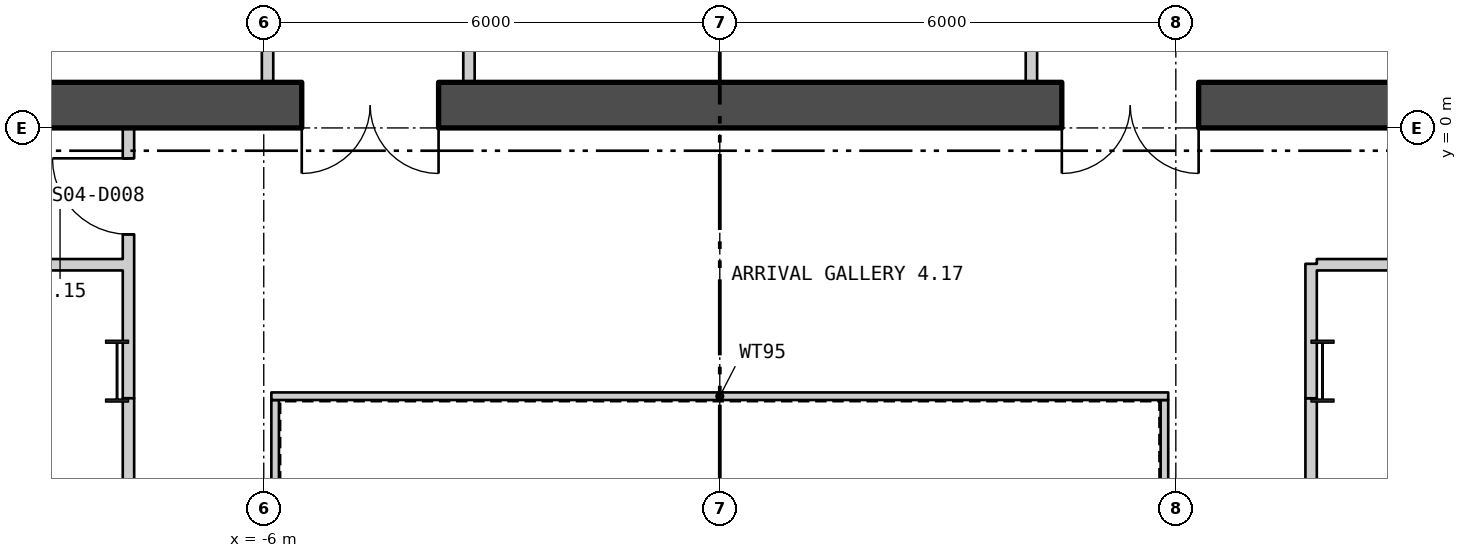
"""IFC4 building model, lengths in metres.
Left out: names, types, materials, properties, quantities, classifications, styles, units other than length and angle.
Written with IfcOpenShell. Run it as: python <this file> out.ifc"""

import sys

from ifc_helpers import new_model, si_unit, direction, frame, frame_2d, origin, origin_2d, place, context, subcontext, project, spatial, polyline, rectangle, i_section, outline, extrude, element, fill, save


model = new_model("IFC4")
c1 = context("Model", 3, precision=1e-05, world=origin(), true_north=direction((0.0, 1.0)))
c2 = subcontext(c1, "Body", "Model", "MODEL_VIEW")
j1 = project(units=[si_unit("LENGTHUNIT", "METRE"), si_unit("PLANEANGLEUNIT", "RADIAN")], contexts=[c1])
p1 = place(None, origin())
s1 = spatial("IfcSite", under=j1, at=p1, CompositionType="ELEMENT")
p2 = place(p1, origin())
s2 = spatial("IfcBuilding", under=s1, at=p2, CompositionType="ELEMENT")
p3 = place(p2, frame((0.0, 0.0, 60.3)))
s3 = spatial("IfcBuildingStorey", under=s2, at=p3, CompositionType="ELEMENT", Elevation=60.3)
for number, where, z_axis, x_axis in (
    (1, (7.93, -3.2, 0.0), (0.0, 0.0, 1.0), (1.0, 0.0, 0.0)),
    (2, (-7.93, -3.2, 0.0), (0.0, 0.0, 1.0), (1.0, 0.0, 0.0)),
):
    element("IfcColumn", number, at=place(p3, frame(where, z_axis=z_axis, x_axis=x_axis)), inside=s3, PredefinedType="COLUMN", context=c2, shape_type="SweptSolid", body=[
        extrude(i_section(OverallWidth=0.303, OverallDepth=0.814, WebThickness=0.021, FlangeThickness=0.04, at=origin_2d()), origin(), (0.0, 0.0, 1.0), 4.5),
    ])
p4 = place(p3, frame((-28.3, 10.579, -0.18), z_axis=(0.0, 0.0, 1.0), x_axis=(0.499999388847, -0.866025756634, 0.0)))
e3 = element("IfcWall", 3, at=p4, inside=s3, PredefinedType="SOLIDWALL", context=c2, shape_type="SweptSolid", body=[
    extrude(outline(polyline([(-0.13, -0.225), (45.88, -0.225), (45.62, 0.225), (0.13, 0.225), (-0.13, -0.225)])), origin(), (0.0, 0.0, 1.0), 4.28),
])
p5 = place(p4, frame((1.425, 0.0, 1.08)))
e4 = element("IfcOpeningElement", 4, at=p5, cuts=e3, PredefinedType="OPENING", context=c2, shape_type="SweptSolid", body=[
    extrude(rectangle(XDim=2.4, YDim=2.6, at=frame_2d((1.2, 1.3))), frame((0.0, 0.235, 0.0), z_axis=(0.0, -1.0, 0.0), x_axis=(1.0, 0.0, 0.0)), (0.0, 0.0, 1.0), 0.47),
])
p6 = place(p4, frame((5.895, 0.0, 1.08)))
e5 = element("IfcOpeningElement", 5, at=p6, cuts=e3, PredefinedType="OPENING", context=c2, shape_type="SweptSolid", body=[
    extrude(rectangle(XDim=2.4, YDim=2.6, at=frame_2d((1.2, 1.3))), frame((0.0, 0.235, 0.0), z_axis=(0.0, -1.0, 0.0), x_axis=(1.0, 0.0, 0.0)), (0.0, 0.0, 1.0), 0.47),
])
p7 = place(p4, frame((10.403, 0.0, 1.08)))
e6 = element("IfcOpeningElement", 6, at=p7, cuts=e3, PredefinedType="OPENING", context=c2, shape_type="SweptSolid", body=[
    extrude(rectangle(XDim=2.4, YDim=2.6, at=frame_2d((1.2, 1.3))), frame((0.0, 0.235, 0.0), z_axis=(0.0, -1.0, 0.0), x_axis=(1.0, 0.0, 0.0)), (0.0, 0.0, 1.0), 0.47),
])
p8 = place(p4, frame((14.912, 0.0, 1.08)))
e7 = element("IfcOpeningElement", 7, at=p8, cuts=e3, PredefinedType="OPENING", context=c2, shape_type="SweptSolid", body=[
    extrude(rectangle(XDim=2.4, YDim=2.6, at=frame_2d((1.2, 1.3))), frame((0.0, 0.235, 0.0), z_axis=(0.0, -1.0, 0.0), x_axis=(1.0, 0.0, 0.0)), (0.0, 0.0, 1.0), 0.47),
])
p9 = place(p4, frame((19.421, 0.0, 1.08)))
e8 = element("IfcOpeningElement", 8, at=p9, cuts=e3, PredefinedType="OPENING", context=c2, shape_type="SweptSolid", body=[
    extrude(rectangle(XDim=2.4, YDim=2.6, at=frame_2d((1.2, 1.3))), frame((0.0, 0.235, 0.0), z_axis=(0.0, -1.0, 0.0), x_axis=(1.0, 0.0, 0.0)), (0.0, 0.0, 1.0), 0.47),
])
p10 = place(p4, frame((23.929, 0.0, 1.08)))
e9 = element("IfcOpeningElement", 9, at=p10, cuts=e3, PredefinedType="OPENING", context=c2, shape_type="SweptSolid", body=[
    extrude(rectangle(XDim=2.4, YDim=2.6, at=frame_2d((1.2, 1.3))), frame((0.0, 0.235, 0.0), z_axis=(0.0, -1.0, 0.0), x_axis=(1.0, 0.0, 0.0)), (0.0, 0.0, 1.0), 0.47),
])
p11 = place(p4, frame((28.438, 0.0, 1.08)))
e10 = element("IfcOpeningElement", 10, at=p11, cuts=e3, PredefinedType="OPENING", context=c2, shape_type="SweptSolid", body=[
    extrude(rectangle(XDim=2.4, YDim=2.6, at=frame_2d((1.2, 1.3))), frame((0.0, 0.235, 0.0), z_axis=(0.0, -1.0, 0.0), x_axis=(1.0, 0.0, 0.0)), (0.0, 0.0, 1.0), 0.47),
])
p12 = place(p4, frame((32.947, 0.0, 1.08)))
e11 = element("IfcOpeningElement", 11, at=p12, cuts=e3, PredefinedType="OPENING", context=c2, shape_type="SweptSolid", body=[
    extrude(rectangle(XDim=2.4, YDim=2.6, at=frame_2d((1.2, 1.3))), frame((0.0, 0.235, 0.0), z_axis=(0.0, -1.0, 0.0), x_axis=(1.0, 0.0, 0.0)), (0.0, 0.0, 1.0), 0.47),
])
p13 = place(p4, frame((37.455, 0.0, 1.08)))
e12 = element("IfcOpeningElement", 12, at=p13, cuts=e3, PredefinedType="OPENING", context=c2, shape_type="SweptSolid", body=[
    extrude(rectangle(XDim=2.4, YDim=2.6, at=frame_2d((1.2, 1.3))), frame((0.0, 0.235, 0.0), z_axis=(0.0, -1.0, 0.0), x_axis=(1.0, 0.0, 0.0)), (0.0, 0.0, 1.0), 0.47),
])
p14 = place(p4, frame((41.925, 0.0, 1.08)))
e13 = element("IfcOpeningElement", 13, at=p14, cuts=e3, PredefinedType="OPENING", context=c2, shape_type="SweptSolid", body=[
    extrude(rectangle(XDim=2.4, YDim=2.6, at=frame_2d((1.2, 1.3))), frame((0.0, 0.235, 0.0), z_axis=(0.0, -1.0, 0.0), x_axis=(1.0, 0.0, 0.0)), (0.0, 0.0, 1.0), 0.47),
])
p15 = place(p3, frame((5.425, -29.042, -0.18), z_axis=(0.0, 0.0, 1.0), x_axis=(0.499999388847, 0.866025756634, 0.0)))
e14 = element("IfcWall", 14, at=p15, inside=s3, PredefinedType="SOLIDWALL", context=c2, shape_type="SweptSolid", body=[
    extrude(outline(polyline([(-0.13, -0.225), (45.88, -0.225), (45.62, 0.225), (0.13, 0.225), (-0.13, -0.225)])), origin(), (0.0, 0.0, 1.0), 4.28),
])
p16 = place(p15, frame((1.425, 0.0, 1.08)))
e15 = element("IfcOpeningElement", 15, at=p16, cuts=e14, PredefinedType="OPENING", context=c2, shape_type="SweptSolid", body=[
    extrude(rectangle(XDim=2.4, YDim=2.6, at=frame_2d((1.2, 1.3))), frame((0.0, 0.235, 0.0), z_axis=(0.0, -1.0, 0.0), x_axis=(1.0, 0.0, 0.0)), (0.0, 0.0, 1.0), 0.47),
])
p17 = place(p15, frame((5.895, 0.0, 1.08)))
e16 = element("IfcOpeningElement", 16, at=p17, cuts=e14, PredefinedType="OPENING", context=c2, shape_type="SweptSolid", body=[
    extrude(rectangle(XDim=2.4, YDim=2.6, at=frame_2d((1.2, 1.3))), frame((0.0, 0.235, 0.0), z_axis=(0.0, -1.0, 0.0), x_axis=(1.0, 0.0, 0.0)), (0.0, 0.0, 1.0), 0.47),
])
p18 = place(p15, frame((10.403, 0.0, 1.08)))
e17 = element("IfcOpeningElement", 17, at=p18, cuts=e14, PredefinedType="OPENING", context=c2, shape_type="SweptSolid", body=[
    extrude(rectangle(XDim=2.4, YDim=2.6, at=frame_2d((1.2, 1.3))), frame((0.0, 0.235, 0.0), z_axis=(0.0, -1.0, 0.0), x_axis=(1.0, 0.0, 0.0)), (0.0, 0.0, 1.0), 0.47),
])
p19 = place(p15, frame((14.912, 0.0, 1.08)))
e18 = element("IfcOpeningElement", 18, at=p19, cuts=e14, PredefinedType="OPENING", context=c2, shape_type="SweptSolid", body=[
    extrude(rectangle(XDim=2.4, YDim=2.6, at=frame_2d((1.2, 1.3))), frame((0.0, 0.235, 0.0), z_axis=(0.0, -1.0, 0.0), x_axis=(1.0, 0.0, 0.0)), (0.0, 0.0, 1.0), 0.47),
])
p20 = place(p15, frame((19.421, 0.0, 1.08)))
e19 = element("IfcOpeningElement", 19, at=p20, cuts=e14, PredefinedType="OPENING", context=c2, shape_type="SweptSolid", body=[
    extrude(rectangle(XDim=2.4, YDim=2.6, at=frame_2d((1.2, 1.3))), frame((0.0, 0.235, 0.0), z_axis=(0.0, -1.0, 0.0), x_axis=(1.0, 0.0, 0.0)), (0.0, 0.0, 1.0), 0.47),
])
p21 = place(p15, frame((23.929, 0.0, 1.08)))
e20 = element("IfcOpeningElement", 20, at=p21, cuts=e14, PredefinedType="OPENING", context=c2, shape_type="SweptSolid", body=[
    extrude(rectangle(XDim=2.4, YDim=2.6, at=frame_2d((1.2, 1.3))), frame((0.0, 0.235, 0.0), z_axis=(0.0, -1.0, 0.0), x_axis=(1.0, 0.0, 0.0)), (0.0, 0.0, 1.0), 0.47),
])
p22 = place(p15, frame((28.438, 0.0, 1.08)))
e21 = element("IfcOpeningElement", 21, at=p22, cuts=e14, PredefinedType="OPENING", context=c2, shape_type="SweptSolid", body=[
    extrude(rectangle(XDim=2.4, YDim=2.6, at=frame_2d((1.2, 1.3))), frame((0.0, 0.235, 0.0), z_axis=(0.0, -1.0, 0.0), x_axis=(1.0, 0.0, 0.0)), (0.0, 0.0, 1.0), 0.47),
])
p23 = place(p15, frame((32.947, 0.0, 1.08)))
e22 = element("IfcOpeningElement", 22, at=p23, cuts=e14, PredefinedType="OPENING", context=c2, shape_type="SweptSolid", body=[
    extrude(rectangle(XDim=2.4, YDim=2.6, at=frame_2d((1.2, 1.3))), frame((0.0, 0.235, 0.0), z_axis=(0.0, -1.0, 0.0), x_axis=(1.0, 0.0, 0.0)), (0.0, 0.0, 1.0), 0.47),
])
p24 = place(p15, frame((37.455, 0.0, 1.08)))
e23 = element("IfcOpeningElement", 23, at=p24, cuts=e14, PredefinedType="OPENING", context=c2, shape_type="SweptSolid", body=[
    extrude(rectangle(XDim=2.4, YDim=2.6, at=frame_2d((1.2, 1.3))), frame((0.0, 0.235, 0.0), z_axis=(0.0, -1.0, 0.0), x_axis=(1.0, 0.0, 0.0)), (0.0, 0.0, 1.0), 0.47),
])
p25 = place(p15, frame((41.925, 0.0, 1.08)))
e24 = element("IfcOpeningElement", 24, at=p25, cuts=e14, PredefinedType="OPENING", context=c2, shape_type="SweptSolid", body=[
    extrude(rectangle(XDim=2.4, YDim=2.6, at=frame_2d((1.2, 1.3))), frame((0.0, 0.235, 0.0), z_axis=(0.0, -1.0, 0.0), x_axis=(1.0, 0.0, 0.0)), (0.0, 0.0, 1.0), 0.47),
])
p26 = place(p3, frame((5.85, -11.62, 0.0), z_axis=(0.0, 0.0, 1.0), x_axis=(0.0, 1.0, 0.0)))
e25 = element("IfcWall", 25, at=p26, inside=s3, PredefinedType="PARTITIONING", context=c2, shape_type="SweptSolid", body=[
    extrude(rectangle(XDim=8.04, YDim=0.1, at=frame_2d((4.02, 0.0))), origin(), (0.0, 0.0, 1.0), 4.3),
])
p27 = place(p3, frame((5.9, -3.53, 0.0), z_axis=(0.0, 0.0, 1.0), x_axis=(-1.0, 0.0, 0.0)))
e26 = element("IfcWall", 26, at=p27, inside=s3, PredefinedType="PARTITIONING", context=c2, shape_type="SweptSolid", body=[
    extrude(rectangle(XDim=11.8, YDim=0.1, at=frame_2d((5.9, 0.0))), origin(), (0.0, 0.0, 1.0), 4.3),
])
p28 = place(p3, frame((-5.85, -3.58, 0.0), z_axis=(0.0, 0.0, 1.0), x_axis=(0.0, -1.0, 0.0)))
e27 = element("IfcWall", 27, at=p28, inside=s3, PredefinedType="PARTITIONING", context=c2, shape_type="SweptSolid", body=[
    extrude(rectangle(XDim=8.04, YDim=0.1, at=frame_2d((4.02, 0.0))), origin(), (0.0, 0.0, 1.0), 4.3),
])
p29 = place(p3, frame((-17.5, 0.3, 0.0), z_axis=(0.0, 0.0, 1.0), x_axis=(1.0, 0.0, 0.0)))
e28 = element("IfcWall", 28, at=p29, inside=s3, PredefinedType="SHEAR", context=c2, shape_type="SweptSolid", body=[
    extrude(rectangle(XDim=35.0, YDim=0.6, at=frame_2d((17.5, 0.0))), origin(), (0.0, 0.0, 1.0), 4.3),
])
p30 = place(p29, frame((12.0, 0.0, 0.0)))
e29 = element("IfcOpeningElement", 29, at=p30, cuts=e28, PredefinedType="OPENING", context=c2, shape_type="SweptSolid", body=[
    extrude(rectangle(XDim=1.8, YDim=2.4, at=frame_2d((0.9, 1.2))), frame((0.0, 0.31, 0.0), z_axis=(0.0, -1.0, 0.0), x_axis=(1.0, 0.0, 0.0)), (0.0, 0.0, 1.0), 0.62),
])
p31 = place(p29, frame((22.0, 0.0, 0.0)))
e30 = element("IfcOpeningElement", 30, at=p31, cuts=e28, PredefinedType="OPENING", context=c2, shape_type="SweptSolid", body=[
    extrude(rectangle(XDim=1.8, YDim=2.4, at=frame_2d((0.9, 1.2))), frame((0.0, 0.31, 0.0), z_axis=(0.0, -1.0, 0.0), x_axis=(1.0, 0.0, 0.0)), (0.0, 0.0, 1.0), 0.62),
])
p32 = place(p3, frame((-5.95, 0.6, 0.0), z_axis=(0.0, 0.0, 1.0), x_axis=(0.0, 1.0, 0.0)))
e31 = element("IfcWall", 31, at=p32, inside=s3, PredefinedType="PARTITIONING", context=c2, shape_type="SweptSolid", body=[
    extrude(rectangle(XDim=3.275, YDim=0.15, at=frame_2d((1.637, 0.0))), origin(), (0.0, 0.0, 1.0), 4.3),
])
for number, where, z_axis, x_axis in (
    (32, (-3.3, 0.6, 0.0), (0.0, 0.0, 1.0), (0.0, 1.0, 0.0)),
    (33, (4.1, 0.6, 0.0), (0.0, 0.0, 1.0), (0.0, 1.0, 0.0)),
):
    element("IfcWall", number, at=place(p3, frame(where, z_axis=z_axis, x_axis=x_axis)), inside=s3, PredefinedType="PARTITIONING", context=c2, shape_type="SweptSolid", body=[
        extrude(rectangle(XDim=3.075, YDim=0.15, at=frame_2d((1.538, 0.0))), origin(), (0.0, 0.0, 1.0), 4.3),
    ])
p33 = place(p3, frame((-19.225, -1.8, 0.0), z_axis=(0.0, 0.0, 1.0), x_axis=(1.0, 0.0, 0.0)))
e34 = element("IfcWall", 34, at=p33, inside=s3, PredefinedType="PARTITIONING", context=c2, shape_type="SweptSolid", body=[
    extrude(rectangle(XDim=11.37, YDim=0.15, at=frame_2d((5.685, 0.0))), origin(), (0.0, 0.0, 1.0), 4.3),
])
p34 = place(p3, frame((-7.78, -13.675, 0.0), z_axis=(0.0, 0.0, 1.0), x_axis=(0.0, 1.0, 0.0)))
e35 = element("IfcWall", 35, at=p34, inside=s3, PredefinedType="PARTITIONING", context=c2, shape_type="SweptSolid", body=[
    extrude(rectangle(XDim=10.118, YDim=0.15, at=frame_2d((5.059, 0.0))), origin(), (0.0, 0.0, 1.0), 3.61),
])
p35 = place(p3, frame((-7.78, -3.557, 0.0), z_axis=(0.0, 0.0, 1.0), x_axis=(0.0, 1.0, 0.0)))
e36 = element("IfcWall", 36, at=p35, inside=s3, PredefinedType="PARTITIONING", context=c2, shape_type="SweptSolid", body=[
    extrude(rectangle(XDim=3.557, YDim=0.15, at=frame_2d((1.778, 0.0))), origin(), (0.0, 0.0, 1.0), 4.3),
])
p36 = place(p35, frame((2.157, 0.0, 0.0)))
e37 = element("IfcOpeningElement", 37, at=p36, cuts=e36, PredefinedType="OPENING", context=c2, shape_type="SweptSolid", body=[
    extrude(rectangle(XDim=1.0, YDim=2.1, at=frame_2d((0.5, 1.05))), frame((0.0, 0.085, 0.0), z_axis=(0.0, -1.0, 0.0), x_axis=(1.0, 0.0, 0.0)), (0.0, 0.0, 1.0), 0.17),
])
p37 = place(p3, frame((7.78, -13.675, 0.0), z_axis=(0.0, 0.0, 1.0), x_axis=(0.0, 1.0, 0.0)))
e38 = element("IfcWall", 38, at=p37, inside=s3, PredefinedType="PARTITIONING", context=c2, shape_type="SweptSolid", body=[
    extrude(rectangle(XDim=10.118, YDim=0.15, at=frame_2d((5.059, 0.0))), origin(), (0.0, 0.0, 1.0), 3.61),
])
p38 = place(p3, frame((7.78, -3.557, 0.0), z_axis=(0.0, 0.0, 1.0), x_axis=(0.0, 1.0, 0.0)))
e39 = element("IfcWall", 39, at=p38, inside=s3, PredefinedType="PARTITIONING", context=c2, shape_type="SweptSolid", body=[
    extrude(rectangle(XDim=1.769, YDim=0.15, at=frame_2d((0.884, 0.0))), origin(), (0.0, 0.0, 1.0), 4.3),
])
p39 = place(p3, frame((7.855, -1.8, 0.0), z_axis=(0.0, 0.0, 1.0), x_axis=(1.0, 0.0, 0.0)))
e40 = element("IfcWall", 40, at=p39, inside=s3, PredefinedType="PARTITIONING", context=c2, shape_type="SweptSolid", body=[
    extrude(rectangle(XDim=11.37, YDim=0.15, at=frame_2d((5.685, 0.0))), origin(), (0.0, 0.0, 1.0), 4.3),
])
p40 = place(p39, frame((2.001, 0.0, 0.0)))
e41 = element("IfcOpeningElement", 41, at=p40, cuts=e40, PredefinedType="OPENING", context=c2, shape_type="SweptSolid", body=[
    extrude(rectangle(XDim=1.0, YDim=2.1, at=frame_2d((0.5, 1.05))), frame((0.0, 0.085, 0.0), z_axis=(0.0, -1.0, 0.0), x_axis=(1.0, 0.0, 0.0)), (0.0, 0.0, 1.0), 0.17),
])
p41 = place(p39, frame((7.455, 0.0, 0.0)))
e42 = element("IfcOpeningElement", 42, at=p41, cuts=e40, PredefinedType="OPENING", context=c2, shape_type="SweptSolid", body=[
    extrude(rectangle(XDim=0.9, YDim=2.1, at=frame_2d((0.45, 1.05))), frame((0.0, 0.085, 0.0), z_axis=(0.0, -1.0, 0.0), x_axis=(1.0, 0.0, 0.0)), (0.0, 0.0, 1.0), 0.17),
])
p42 = place(p30, origin())
e43 = element("IfcDoor", 43, at=p42, inside=s3, OperationType="DOUBLE_DOOR_SINGLE_SWING", PredefinedType="DOOR", context=c2, shape_type="SweptSolid", body=[
    extrude(rectangle(XDim=1.8, YDim=2.4, at=frame_2d((0.9, 1.2))), frame((0.0, 0.025, 0.0), z_axis=(0.0, -1.0, 0.0), x_axis=(1.0, 0.0, 0.0)), (0.0, 0.0, 1.0), 0.05),
])
fill(e29, e43)
p43 = place(p31, origin())
e44 = element("IfcDoor", 44, at=p43, inside=s3, OperationType="DOUBLE_DOOR_SINGLE_SWING", PredefinedType="DOOR", context=c2, shape_type="SweptSolid", body=[
    extrude(rectangle(XDim=1.8, YDim=2.4, at=frame_2d((0.9, 1.2))), frame((0.0, 0.025, 0.0), z_axis=(0.0, -1.0, 0.0), x_axis=(1.0, 0.0, 0.0)), (0.0, 0.0, 1.0), 0.05),
])
fill(e30, e44)
p44 = place(p36, origin())
e45 = element("IfcDoor", 45, at=p44, inside=s3, OperationType="SINGLE_SWING_LEFT", PredefinedType="DOOR", context=c2, shape_type="SweptSolid", body=[
    extrude(rectangle(XDim=1.0, YDim=2.1, at=frame_2d((0.5, 1.05))), frame((0.0, 0.025, 0.0), z_axis=(0.0, -1.0, 0.0), x_axis=(1.0, 0.0, 0.0)), (0.0, 0.0, 1.0), 0.05),
])
fill(e37, e45)
save(model, sys.argv[1])
